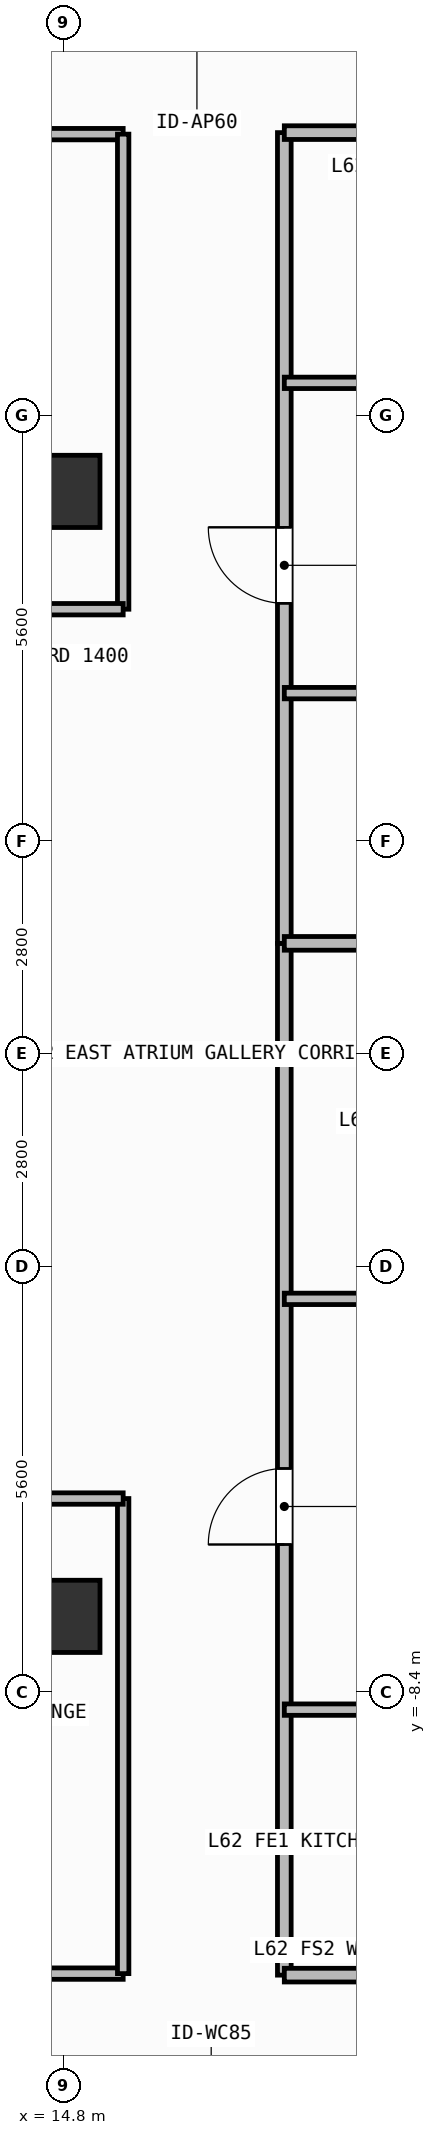
"""IFC4 building model, lengths in metres.
Left out: names, types, materials, properties, quantities, classifications, styles, units other than length and angle.
Written with IfcOpenShell. Run it as: python <this file> out.ifc"""

import sys

from ifc_helpers import new_model, si_unit, direction, frame, frame_2d, origin, origin_2d, place, context, subcontext, project, spatial, rectangle, extrude, element, fill, save


model = new_model("IFC4")
c1 = context("Model", 3, precision=1e-05, world=origin(), true_north=direction((0.0, 1.0)))
c2 = subcontext(c1, "Body", "Model", "MODEL_VIEW")
j1 = project(units=[si_unit("LENGTHUNIT", "METRE"), si_unit("PLANEANGLEUNIT", "RADIAN")], contexts=[c1])
p1 = place(None, origin())
s1 = spatial("IfcSite", under=j1, at=p1, CompositionType="ELEMENT")
p2 = place(p1, origin())
s2 = spatial("IfcBuilding", under=s1, at=p2, CompositionType="ELEMENT")
p3 = place(p2, frame((0.0, 0.0, 254.7)))
s3 = spatial("IfcBuildingStorey", under=s2, at=p3, CompositionType="ELEMENT", Elevation=254.7)
for number, where, z_axis, x_axis in (
    (1, (14.8, -7.4, 0.0), (0.0, 0.0, 1.0), (1.0, 0.0, 0.0)),
    (2, (14.8, 7.4, 0.0), (0.0, 0.0, 1.0), (1.0, 0.0, 0.0)),
):
    element("IfcColumn", number, at=place(p3, frame(where, z_axis=z_axis, x_axis=x_axis)), inside=s3, PredefinedType="COLUMN", context=c2, shape_type="SweptSolid", body=[
        extrude(rectangle(XDim=0.95, YDim=0.95, at=origin_2d()), origin(), (0.0, 0.0, 1.0), 3.9),
    ])
p4 = place(p3, frame((10.1, -12.1, 0.0), z_axis=(0.0, 0.0, 1.0), x_axis=(1.0, 0.0, 0.0)))
e3 = element("IfcWall", 3, at=p4, inside=s3, PredefinedType="PARTITIONING", context=c2, shape_type="SweptSolid", body=[
    extrude(rectangle(XDim=5.48, YDim=0.15, at=frame_2d((2.74, 0.0))), origin(), (0.0, 0.0, 1.0), 3.68),
])
p5 = place(p4, frame((2.29, 0.0, 0.0)))
e4 = element("IfcOpeningElement", 4, at=p5, cuts=e3, PredefinedType="OPENING", context=c2, shape_type="SweptSolid", body=[
    extrude(rectangle(XDim=0.9, YDim=2.1, at=frame_2d((0.45, 1.05))), frame((0.0, 0.085, 0.0), z_axis=(0.0, -1.0, 0.0), x_axis=(1.0, 0.0, 0.0)), (0.0, 0.0, 1.0), 0.17),
])
p6 = place(p3, frame((8.36, 12.1, 0.0), z_axis=(0.0, 0.0, 1.0), x_axis=(1.0, 0.0, 0.0)))
e5 = element("IfcWall", 5, at=p6, inside=s3, PredefinedType="PARTITIONING", context=c2, shape_type="SweptSolid", body=[
    extrude(rectangle(XDim=7.22, YDim=0.15, at=frame_2d((3.61, 0.0))), origin(), (0.0, 0.0, 1.0), 3.68),
])
p7 = place(p6, frame((3.513, 0.0, 0.0)))
e6 = element("IfcOpeningElement", 6, at=p7, cuts=e5, PredefinedType="OPENING", context=c2, shape_type="SweptSolid", body=[
    extrude(rectangle(XDim=0.9, YDim=2.1, at=frame_2d((0.45, 1.05))), frame((0.0, 0.085, 0.0), z_axis=(0.0, -1.0, 0.0), x_axis=(1.0, 0.0, 0.0)), (0.0, 0.0, 1.0), 0.17),
])
p8 = place(p3, frame((17.7, -12.12, 0.0), z_axis=(0.0, 0.0, 1.0), x_axis=(0.0, 1.0, 0.0)))
e7 = element("IfcWall", 7, at=p8, inside=s3, PredefinedType="PARTITIONING", context=c2, shape_type="SweptSolid", body=[
    extrude(rectangle(XDim=13.574, YDim=0.18, at=frame_2d((6.787, 0.0))), origin(), (0.0, 0.0, 1.0), 3.68),
])
p9 = place(p8, frame((5.665, 0.0, 0.0)))
e8 = element("IfcOpeningElement", 8, at=p9, cuts=e7, PredefinedType="OPENING", context=c2, shape_type="SweptSolid", body=[
    extrude(rectangle(XDim=1.0, YDim=2.2, at=frame_2d((0.5, 1.1))), frame((0.0, 0.1, 0.0), z_axis=(0.0, -1.0, 0.0), x_axis=(1.0, 0.0, 0.0)), (0.0, 0.0, 1.0), 0.2),
])
p10 = place(p3, frame((17.7, -3.223, 0.0), z_axis=(0.0, 0.0, 1.0), x_axis=(1.0, 0.0, 0.0)))
e9 = element("IfcWall", 9, at=p10, inside=s3, PredefinedType="PARTITIONING", context=c2, shape_type="SweptSolid", body=[
    extrude(rectangle(XDim=3.879, YDim=0.15, at=frame_2d((1.939, 0.0))), origin(), (0.0, 0.0, 1.0), 3.68),
])
p11 = place(p10, frame((1.514, 0.0, 0.0)))
e10 = element("IfcOpeningElement", 10, at=p11, cuts=e9, PredefinedType="OPENING", context=c2, shape_type="SweptSolid", body=[
    extrude(rectangle(XDim=0.85, YDim=2.1, at=frame_2d((0.425, 1.05))), frame((0.0, 0.085, 0.0), z_axis=(0.0, -1.0, 0.0), x_axis=(1.0, 0.0, 0.0)), (0.0, 0.0, 1.0), 0.17),
])
p12 = place(p3, frame((17.7, -8.627, 0.0), z_axis=(0.0, 0.0, 1.0), x_axis=(1.0, 0.0, 0.0)))
e11 = element("IfcWall", 11, at=p12, inside=s3, PredefinedType="PARTITIONING", context=c2, shape_type="SweptSolid", body=[
    extrude(rectangle(XDim=3.879, YDim=0.15, at=frame_2d((1.939, 0.0))), origin(), (0.0, 0.0, 1.0), 3.68),
])
p13 = place(p12, frame((2.192, 0.0, 0.0)))
e12 = element("IfcOpeningElement", 12, at=p13, cuts=e11, PredefinedType="OPENING", context=c2, shape_type="SweptSolid", body=[
    extrude(rectangle(XDim=0.85, YDim=2.1, at=frame_2d((0.425, 1.05))), frame((0.0, 0.085, 0.0), z_axis=(0.0, -1.0, 0.0), x_axis=(1.0, 0.0, 0.0)), (0.0, 0.0, 1.0), 0.17),
])
p14 = place(p3, frame((17.7, 1.454, 0.0), z_axis=(0.0, 0.0, 1.0), x_axis=(0.0, 1.0, 0.0)))
e13 = element("IfcWall", 13, at=p14, inside=s3, PredefinedType="PARTITIONING", context=c2, shape_type="SweptSolid", body=[
    extrude(rectangle(XDim=10.666, YDim=0.18, at=frame_2d((5.333, 0.0))), origin(), (0.0, 0.0, 1.0), 3.68),
])
p15 = place(p14, frame((4.473, 0.0, 0.0)))
e14 = element("IfcOpeningElement", 14, at=p15, cuts=e13, PredefinedType="OPENING", context=c2, shape_type="SweptSolid", body=[
    extrude(rectangle(XDim=1.0, YDim=2.2, at=frame_2d((0.5, 1.1))), frame((0.0, 0.1, 0.0), z_axis=(0.0, -1.0, 0.0), x_axis=(1.0, 0.0, 0.0)), (0.0, 0.0, 1.0), 0.2),
])
p16 = place(p3, frame((17.7, 8.828, 0.0), z_axis=(0.0, 0.0, 1.0), x_axis=(1.0, 0.0, 0.0)))
e15 = element("IfcWall", 15, at=p16, inside=s3, PredefinedType="PARTITIONING", context=c2, shape_type="SweptSolid", body=[
    extrude(rectangle(XDim=3.677, YDim=0.15, at=frame_2d((1.838, 0.0))), origin(), (0.0, 0.0, 1.0), 3.68),
])
p17 = place(p16, frame((2.309, 0.0, 0.0)))
e16 = element("IfcOpeningElement", 16, at=p17, cuts=e15, PredefinedType="OPENING", context=c2, shape_type="SweptSolid", body=[
    extrude(rectangle(XDim=0.85, YDim=2.1, at=frame_2d((0.425, 1.05))), frame((0.0, 0.085, 0.0), z_axis=(0.0, -1.0, 0.0), x_axis=(1.0, 0.0, 0.0)), (0.0, 0.0, 1.0), 0.17),
])
p18 = place(p3, frame((17.7, 4.746, 0.0), z_axis=(0.0, 0.0, 1.0), x_axis=(1.0, 0.0, 0.0)))
e17 = element("IfcWall", 17, at=p18, inside=s3, PredefinedType="PARTITIONING", context=c2, shape_type="SweptSolid", body=[
    extrude(rectangle(XDim=3.677, YDim=0.15, at=frame_2d((1.838, 0.0))), origin(), (0.0, 0.0, 1.0), 3.68),
])
p19 = place(p18, frame((1.414, 0.0, 0.0)))
e18 = element("IfcOpeningElement", 18, at=p19, cuts=e17, PredefinedType="OPENING", context=c2, shape_type="SweptSolid", body=[
    extrude(rectangle(XDim=0.85, YDim=2.1, at=frame_2d((0.425, 1.05))), frame((0.0, 0.085, 0.0), z_axis=(0.0, -1.0, 0.0), x_axis=(1.0, 0.0, 0.0)), (0.0, 0.0, 1.0), 0.17),
])
p20 = place(p3, frame((15.58, -12.1, 0.0), z_axis=(0.0, 0.0, 1.0), x_axis=(0.0, 1.0, 0.0)))
e19 = element("IfcWall", 19, at=p20, inside=s3, PredefinedType="PARTITIONING", context=c2, shape_type="SweptSolid", body=[
    extrude(rectangle(XDim=6.25, YDim=0.15, at=frame_2d((3.125, 0.0))), origin(), (0.0, 0.0, 1.0), 3.68),
])
p21 = place(p3, frame((8.96, -5.85, 0.0), z_axis=(0.0, 0.0, 1.0), x_axis=(1.0, 0.0, 0.0)))
e20 = element("IfcWall", 20, at=p21, inside=s3, PredefinedType="PARTITIONING", context=c2, shape_type="SweptSolid", body=[
    extrude(rectangle(XDim=6.62, YDim=0.15, at=frame_2d((3.31, 0.0))), origin(), (0.0, 0.0, 1.0), 3.68),
])
p22 = place(p3, frame((15.58, 5.85, 0.0), z_axis=(0.0, 0.0, 1.0), x_axis=(0.0, 1.0, 0.0)))
e21 = element("IfcWall", 21, at=p22, inside=s3, PredefinedType="PARTITIONING", context=c2, shape_type="SweptSolid", body=[
    extrude(rectangle(XDim=6.25, YDim=0.15, at=frame_2d((3.125, 0.0))), origin(), (0.0, 0.0, 1.0), 3.68),
])
p23 = place(p3, frame((8.96, 5.85, 0.0), z_axis=(0.0, 0.0, 1.0), x_axis=(1.0, 0.0, 0.0)))
e22 = element("IfcWall", 22, at=p23, inside=s3, PredefinedType="PARTITIONING", context=c2, shape_type="SweptSolid", body=[
    extrude(rectangle(XDim=6.62, YDim=0.15, at=frame_2d((3.31, 0.0))), origin(), (0.0, 0.0, 1.0), 3.68),
])
for number, where, z_axis, x_axis in (
    (23, (17.7, 1.454, 0.0), (0.0, 0.0, 1.0), (1.0, 0.0, 0.0)),
    (24, (17.7, -12.12, 0.0), (0.0, 0.0, 1.0), (1.0, 0.0, 0.0)),
    (25, (17.7, 12.12, 0.0), (0.0, 0.0, 1.0), (1.0, 0.0, 0.0)),
):
    element("IfcWall", number, at=place(p3, frame(where, z_axis=z_axis, x_axis=x_axis)), inside=s3, PredefinedType="PARTITIONING", context=c2, shape_type="SweptSolid", body=[
        extrude(rectangle(XDim=7.03, YDim=0.18, at=frame_2d((3.515, 0.0))), origin(), (0.0, 0.0, 1.0), 3.68),
    ])
p24 = place(p9, origin())
e26 = element("IfcDoor", 26, at=p24, inside=s3, OperationType="SINGLE_SWING_LEFT", PredefinedType="DOOR", context=c2, shape_type="SweptSolid", body=[
    extrude(rectangle(XDim=1.0, YDim=2.2, at=frame_2d((0.5, 1.1))), frame((0.0, 0.025, 0.0), z_axis=(0.0, -1.0, 0.0), x_axis=(1.0, 0.0, 0.0)), (0.0, 0.0, 1.0), 0.05),
])
fill(e8, e26)
p25 = place(p15, origin())
e27 = element("IfcDoor", 27, at=p25, inside=s3, OperationType="SINGLE_SWING_RIGHT", PredefinedType="DOOR", context=c2, shape_type="SweptSolid", body=[
    extrude(rectangle(XDim=1.0, YDim=2.2, at=frame_2d((0.5, 1.1))), frame((0.0, 0.025, 0.0), z_axis=(0.0, -1.0, 0.0), x_axis=(1.0, 0.0, 0.0)), (0.0, 0.0, 1.0), 0.05),
])
fill(e14, e27)
save(model, sys.argv[1])
